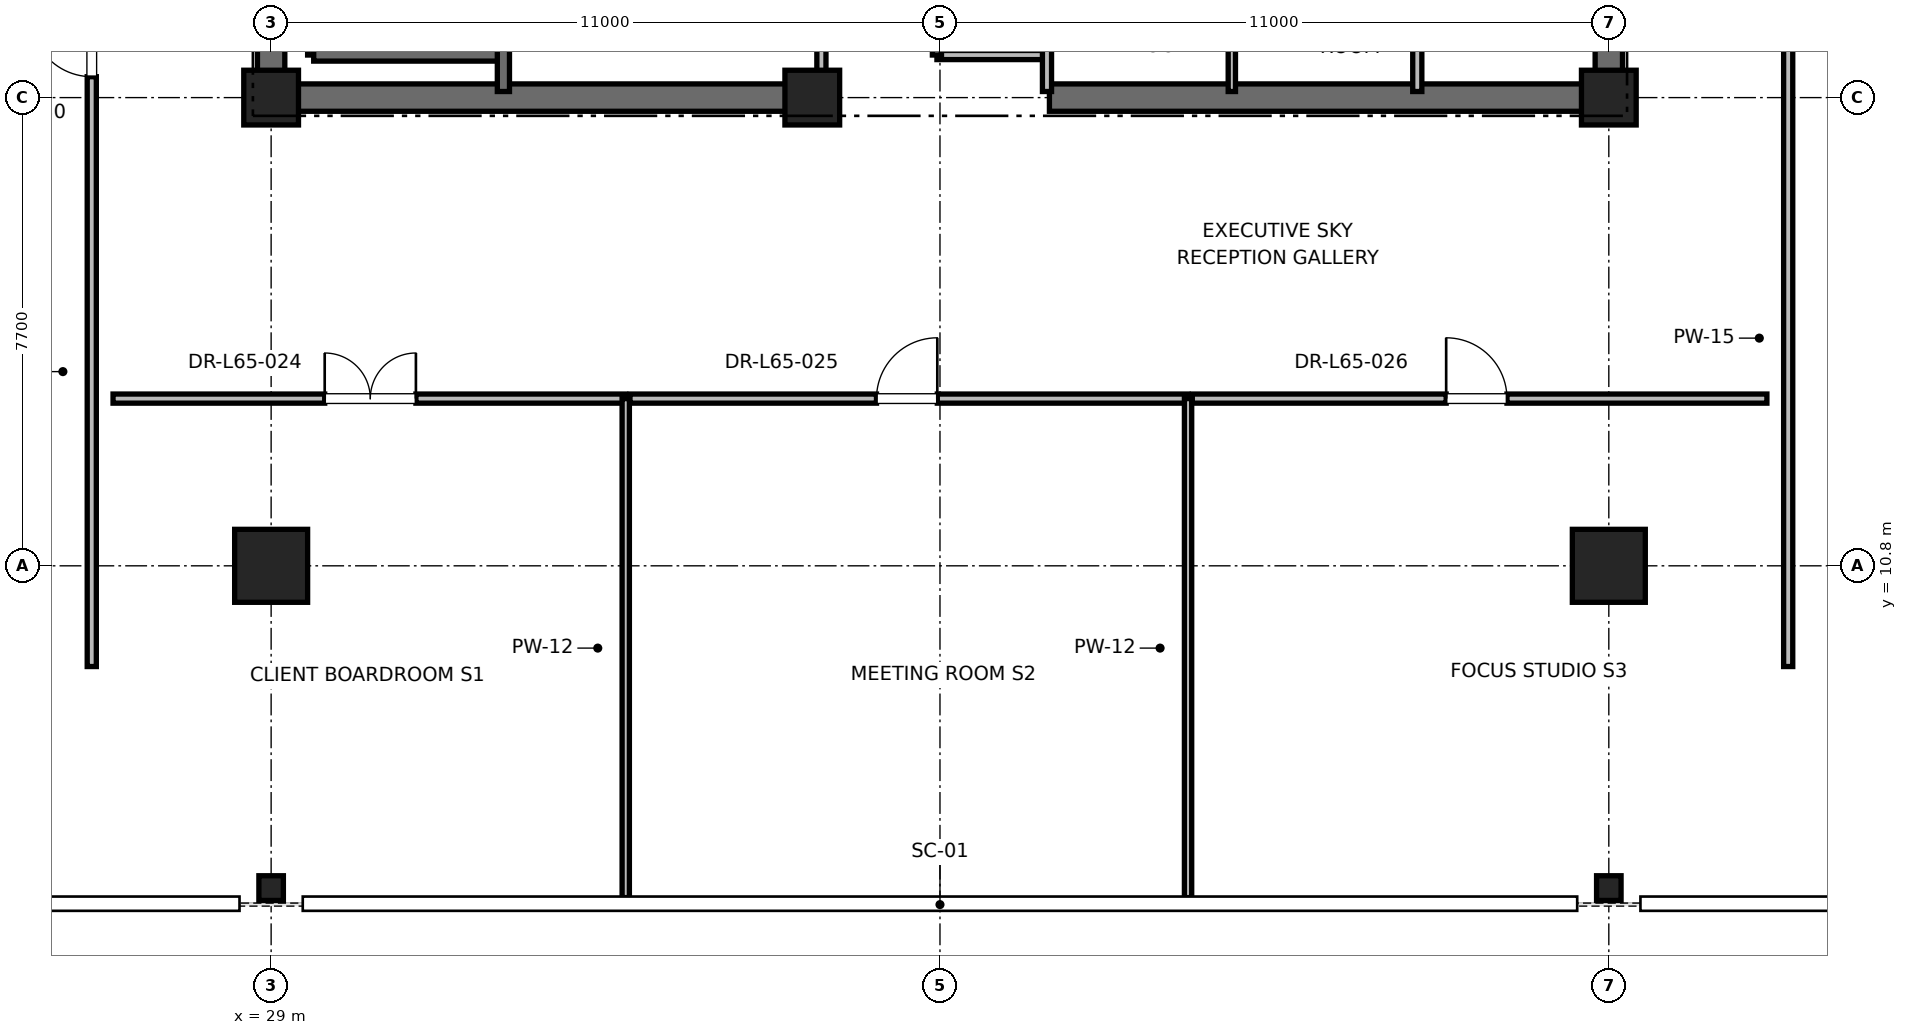
"""IFC4 building model, lengths in metres.
Left out: names, types, materials, properties, quantities, classifications, styles, units other than length and angle.
Written with IfcOpenShell. Run it as: python <this file> out.ifc"""

import sys

from ifc_helpers import new_model, si_unit, direction, frame, frame_2d, origin, origin_2d, place, context, subcontext, project, spatial, rectangle, i_section, extrude, element, fill, save


model = new_model("IFC4")
c1 = context("Model", 3, precision=1e-05, world=origin(), true_north=direction((0.0, 1.0)))
c2 = subcontext(c1, "Body", "Model", "MODEL_VIEW")
j1 = project(units=[si_unit("LENGTHUNIT", "METRE"), si_unit("PLANEANGLEUNIT", "RADIAN")], contexts=[c1])
p1 = place(None, origin())
s1 = spatial("IfcSite", under=j1, at=p1, CompositionType="ELEMENT")
p2 = place(p1, origin())
s2 = spatial("IfcBuilding", under=s1, at=p2, CompositionType="ELEMENT")
p3 = place(p2, frame((0.0, 0.0, 279.2)))
s3 = spatial("IfcBuildingStorey", under=s2, at=p3, CompositionType="ELEMENT", Elevation=279.2)
for number, where, z_axis, x_axis in (
    (1, (29.0, 10.8, 0.0), (0.0, 0.0, 1.0), (1.0, 0.0, 0.0)),
    (2, (51.0, 10.8, 0.0), (0.0, 0.0, 1.0), (1.0, 0.0, 0.0)),
):
    element("IfcColumn", number, at=place(p3, frame(where, z_axis=z_axis, x_axis=x_axis)), inside=s3, PredefinedType="COLUMN", context=c2, shape_type="SweptSolid", body=[
        extrude(rectangle(XDim=1.2, YDim=1.2, at=origin_2d()), origin(), (0.0, 0.0, 1.0), 4.0),
    ])
for number, where, z_axis, x_axis in (
    (3, (29.0, 5.5, 0.0), (0.0, 0.0, 1.0), (1.0, 0.0, 0.0)),
    (4, (51.0, 5.5, 0.0), (0.0, 0.0, 1.0), (1.0, 0.0, 0.0)),
):
    element("IfcColumn", number, at=place(p3, frame(where, z_axis=z_axis, x_axis=x_axis)), inside=s3, PredefinedType="COLUMN", context=c2, shape_type="SweptSolid", body=[
        extrude(i_section(OverallWidth=0.403, OverallDepth=0.406, WebThickness=0.027, FlangeThickness=0.043, FilletRadius=0.015, at=origin_2d()), origin(), (0.0, 0.0, 1.0), 4.0),
    ])
for number, where, z_axis, x_axis in (
    (5, (29.0, 18.5, 0.0), (0.0, 0.0, 1.0), (1.0, 0.0, 0.0)),
    (6, (51.0, 18.5, 0.0), (0.0, 0.0, 1.0), (1.0, 0.0, 0.0)),
    (7, (37.9, 18.5, 0.0), (0.0, 0.0, 1.0), (1.0, 0.0, 0.0)),
):
    element("IfcColumn", number, at=place(p3, frame(where, z_axis=z_axis, x_axis=x_axis)), inside=s3, PredefinedType="PILASTER", context=c2, shape_type="SweptSolid", body=[
        extrude(rectangle(XDim=0.9, YDim=0.9, at=origin_2d()), origin(), (0.0, 0.0, 1.0), 4.0),
    ])
for number, where, z_axis, x_axis in (
    (8, (29.0, 18.5, 0.0), (0.0, 0.0, 1.0), (1.0, 0.0, 0.0)),
    (9, (41.8, 18.5, 0.0), (0.0, 0.0, 1.0), (1.0, 0.0, 0.0)),
):
    element("IfcWall", number, at=place(p3, frame(where, z_axis=z_axis, x_axis=x_axis)), inside=s3, PredefinedType="SHEAR", context=c2, shape_type="SweptSolid", body=[
        extrude(rectangle(XDim=9.2, YDim=0.45, at=frame_2d((4.6, 0.0))), origin(), (0.0, 0.0, 1.0), 3.785),
    ])
p4 = place(p3, frame((29.0, 18.5, 0.0), z_axis=(0.0, 0.0, 1.0), x_axis=(0.0, 1.0, 0.0)))
e10 = element("IfcWall", 10, at=p4, inside=s3, PredefinedType="SHEAR", context=c2, shape_type="SweptSolid", body=[
    extrude(rectangle(XDim=8.8, YDim=0.45, at=frame_2d((4.4, 0.0))), origin(), (0.0, 0.0, 1.0), 3.785),
])
p5 = place(p3, frame((51.0, 18.5, 0.0), z_axis=(0.0, 0.0, 1.0), x_axis=(0.0, 1.0, 0.0)))
e11 = element("IfcWall", 11, at=p5, inside=s3, PredefinedType="SHEAR", context=c2, shape_type="SweptSolid", body=[
    extrude(rectangle(XDim=5.8, YDim=0.45, at=frame_2d((2.9, 0.0))), origin(), (0.0, 0.0, 1.0), 3.785),
])
p6 = place(p3, frame((29.7, 19.2, 0.0), z_axis=(0.0, 0.0, 1.0), x_axis=(0.0, 1.0, 0.0)))
e12 = element("IfcWall", 12, at=p6, inside=s3, PredefinedType="SOLIDWALL", context=c2, shape_type="SweptSolid", body=[
    extrude(rectangle(XDim=8.15, YDim=0.2, at=frame_2d((4.075, 0.0))), origin(), (0.0, 0.0, 1.0), 3.785),
])
p7 = place(p3, frame((29.7, 19.2, 0.0), z_axis=(0.0, 0.0, 1.0), x_axis=(1.0, 0.0, 0.0)))
e13 = element("IfcWall", 13, at=p7, inside=s3, PredefinedType="SOLIDWALL", context=c2, shape_type="SweptSolid", body=[
    extrude(rectangle(XDim=3.12, YDim=0.2, at=frame_2d((1.56, 0.0))), origin(), (0.0, 0.0, 1.0), 3.785),
])
p8 = place(p3, frame((32.82, 18.6, 0.0), z_axis=(0.0, 0.0, 1.0), x_axis=(0.0, 1.0, 0.0)))
e14 = element("IfcWall", 14, at=p8, inside=s3, PredefinedType="SOLIDWALL", context=c2, shape_type="SweptSolid", body=[
    extrude(rectangle(XDim=8.78, YDim=0.2, at=frame_2d((4.39, 0.0))), origin(), (0.0, 0.0, 1.0), 3.785),
])
p9 = place(p3, frame((39.95, 19.2, 0.0), z_axis=(0.0, 0.0, 1.0), x_axis=(1.0, 0.0, 0.0)))
e15 = element("IfcWall", 15, at=p9, inside=s3, PredefinedType="PARTITIONING", context=c2, shape_type="SweptSolid", body=[
    extrude(rectangle(XDim=1.81, YDim=0.15, at=frame_2d((0.905, 0.0))), origin(), (0.0, 0.0, 1.0), 2.85),
])
p10 = place(p3, frame((41.76, 18.6, 0.0), z_axis=(0.0, 0.0, 1.0), x_axis=(0.0, 1.0, 0.0)))
e16 = element("IfcWall", 16, at=p10, inside=s3, PredefinedType="PARTITIONING", context=c2, shape_type="SweptSolid", body=[
    extrude(rectangle(XDim=3.6, YDim=0.15, at=frame_2d((1.8, 0.0))), origin(), (0.0, 0.0, 1.0), 2.85),
])
p11 = place(p3, frame((39.95, 19.2, 0.0), z_axis=(0.0, 0.0, 1.0), x_axis=(0.0, 1.0, 0.0)))
e17 = element("IfcWall", 17, at=p11, inside=s3, PredefinedType="PARTITIONING", context=c2, shape_type="SweptSolid", body=[
    extrude(rectangle(XDim=3.0, YDim=0.15, at=frame_2d((1.5, 0.0))), origin(), (0.0, 0.0, 1.0), 2.85),
])
p12 = place(p11, frame((1.05, 0.0, 0.0)))
e18 = element("IfcOpeningElement", 18, at=p12, cuts=e17, PredefinedType="OPENING", context=c2, shape_type="SweptSolid", body=[
    extrude(rectangle(XDim=0.9, YDim=2.1, at=frame_2d((0.45, 1.05))), frame((0.0, 0.075, 0.0), z_axis=(0.0, -1.0, 0.0), x_axis=(1.0, 0.0, 0.0)), (0.0, 0.0, 1.0), 0.15),
])
p13 = place(p3, frame((38.05, 18.6, 0.0), z_axis=(0.0, 0.0, 1.0), x_axis=(0.0, 1.0, 0.0)))
e19 = element("IfcWall", 19, at=p13, inside=s3, PredefinedType="PARTITIONING", context=c2, shape_type="SweptSolid", body=[
    extrude(rectangle(XDim=4.46, YDim=0.15, at=frame_2d((2.23, 0.0))), origin(), (0.0, 0.0, 1.0), 2.85),
])
p14 = place(p13, frame((1.73, 0.0, 0.0)))
e20 = element("IfcOpeningElement", 20, at=p14, cuts=e19, PredefinedType="OPENING", context=c2, shape_type="SweptSolid", body=[
    extrude(rectangle(XDim=1.0, YDim=2.15, at=frame_2d((0.5, 1.075))), frame((0.0, 0.075, 0.0), z_axis=(0.0, -1.0, 0.0), x_axis=(1.0, 0.0, 0.0)), (0.0, 0.0, 1.0), 0.15),
])
p15 = place(p3, frame((47.85, 18.6, 0.0), z_axis=(0.0, 0.0, 1.0), x_axis=(0.0, 1.0, 0.0)))
e21 = element("IfcWall", 21, at=p15, inside=s3, PredefinedType="PARTITIONING", context=c2, shape_type="SweptSolid", body=[
    extrude(rectangle(XDim=2.54, YDim=0.15, at=frame_2d((1.27, 0.0))), origin(), (0.0, 0.0, 1.0), 2.85),
])
p16 = place(p3, frame((44.8, 18.6, 0.0), z_axis=(0.0, 0.0, 1.0), x_axis=(0.0, 1.0, 0.0)))
e22 = element("IfcWall", 22, at=p16, inside=s3, PredefinedType="PARTITIONING", context=c2, shape_type="SweptSolid", body=[
    extrude(rectangle(XDim=3.02, YDim=0.12, at=frame_2d((1.51, 0.0))), origin(), (0.0, 0.0, 1.0), 2.85),
])
p17 = place(p3, frame((26.4, 13.55, 0.0), z_axis=(0.0, 0.0, 1.0), x_axis=(1.0, 0.0, 0.0)))
e23 = element("IfcWall", 23, at=p17, inside=s3, PredefinedType="PARTITIONING", context=c2, shape_type="SweptSolid", body=[
    extrude(rectangle(XDim=8.432, YDim=0.15, at=frame_2d((4.216, 0.0))), origin(), (0.0, 0.0, 1.0), 2.85),
])
p18 = place(p17, frame((3.481, 0.0, 0.0)))
e24 = element("IfcOpeningElement", 24, at=p18, cuts=e23, PredefinedType="OPENING", context=c2, shape_type="SweptSolid", body=[
    extrude(rectangle(XDim=1.5, YDim=2.25, at=frame_2d((0.75, 1.125))), frame((0.0, 0.075, 0.0), z_axis=(0.0, -1.0, 0.0), x_axis=(1.0, 0.0, 0.0)), (0.0, 0.0, 1.0), 0.15),
])
p19 = place(p3, frame((34.832, 5.344, 0.0), z_axis=(0.0, 0.0, 1.0), x_axis=(0.0, 1.0, 0.0)))
e25 = element("IfcWall", 25, at=p19, inside=s3, PredefinedType="PARTITIONING", context=c2, shape_type="SweptSolid", body=[
    extrude(rectangle(XDim=8.206, YDim=0.12, at=frame_2d((4.103, 0.0))), origin(), (0.0, 0.0, 1.0), 2.415),
])
p20 = place(p3, frame((34.902, 13.55, 0.0), z_axis=(0.0, 0.0, 1.0), x_axis=(1.0, 0.0, 0.0)))
e26 = element("IfcWall", 26, at=p20, inside=s3, PredefinedType="PARTITIONING", context=c2, shape_type="SweptSolid", body=[
    extrude(rectangle(XDim=9.178, YDim=0.15, at=frame_2d((4.589, 0.0))), origin(), (0.0, 0.0, 1.0), 2.85),
])
p21 = place(p20, frame((4.054, 0.0, 0.0)))
e27 = element("IfcOpeningElement", 27, at=p21, cuts=e26, PredefinedType="OPENING", context=c2, shape_type="SweptSolid", body=[
    extrude(rectangle(XDim=1.0, YDim=2.15, at=frame_2d((0.5, 1.075))), frame((0.0, 0.075, 0.0), z_axis=(0.0, -1.0, 0.0), x_axis=(1.0, 0.0, 0.0)), (0.0, 0.0, 1.0), 0.15),
])
p22 = place(p3, frame((44.08, 5.344, 0.0), z_axis=(0.0, 0.0, 1.0), x_axis=(0.0, 1.0, 0.0)))
e28 = element("IfcWall", 28, at=p22, inside=s3, PredefinedType="PARTITIONING", context=c2, shape_type="SweptSolid", body=[
    extrude(rectangle(XDim=8.206, YDim=0.12, at=frame_2d((4.103, 0.0))), origin(), (0.0, 0.0, 1.0), 2.415),
])
p23 = place(p3, frame((44.15, 13.55, 0.0), z_axis=(0.0, 0.0, 1.0), x_axis=(1.0, 0.0, 0.0)))
e29 = element("IfcWall", 29, at=p23, inside=s3, PredefinedType="PARTITIONING", context=c2, shape_type="SweptSolid", body=[
    extrude(rectangle(XDim=9.45, YDim=0.15, at=frame_2d((4.725, 0.0))), origin(), (0.0, 0.0, 1.0), 2.85),
])
p24 = place(p23, frame((4.175, 0.0, 0.0)))
e30 = element("IfcOpeningElement", 30, at=p24, cuts=e29, PredefinedType="OPENING", context=c2, shape_type="SweptSolid", body=[
    extrude(rectangle(XDim=1.0, YDim=2.15, at=frame_2d((0.5, 1.075))), frame((0.0, 0.075, 0.0), z_axis=(0.0, -1.0, 0.0), x_axis=(1.0, 0.0, 0.0)), (0.0, 0.0, 1.0), 0.15),
])
p25 = place(p3, frame((26.05, 9.144, 0.0), z_axis=(0.0, 0.0, 1.0), x_axis=(0.0, 1.0, 0.0)))
e31 = element("IfcWall", 31, at=p25, inside=s3, PredefinedType="PARTITIONING", context=c2, shape_type="SweptSolid", body=[
    extrude(rectangle(XDim=11.014, YDim=0.15, at=frame_2d((5.507, 0.0))), origin(), (0.0, 0.0, 1.0), 2.85),
])
p26 = place(p25, frame((9.7, 0.0, 0.0)))
e32 = element("IfcOpeningElement", 32, at=p26, cuts=e31, PredefinedType="OPENING", context=c2, shape_type="SweptSolid", body=[
    extrude(rectangle(XDim=1.0, YDim=2.15, at=frame_2d((0.5, 1.075))), frame((0.0, 0.075, 0.0), z_axis=(0.0, -1.0, 0.0), x_axis=(1.0, 0.0, 0.0)), (0.0, 0.0, 1.0), 0.15),
])
p27 = place(p3, frame((53.95, 9.144, 0.0), z_axis=(0.0, 0.0, 1.0), x_axis=(0.0, 1.0, 0.0)))
e33 = element("IfcWall", 33, at=p27, inside=s3, PredefinedType="PARTITIONING", context=c2, shape_type="SweptSolid", body=[
    extrude(rectangle(XDim=13.216, YDim=0.15, at=frame_2d((6.608, 0.0))), origin(), (0.0, 0.0, 1.0), 2.85),
])
p28 = place(p27, frame((10.802, 0.0, 0.0)))
e34 = element("IfcOpeningElement", 34, at=p28, cuts=e33, PredefinedType="OPENING", context=c2, shape_type="SweptSolid", body=[
    extrude(rectangle(XDim=1.0, YDim=2.15, at=frame_2d((0.5, 1.075))), frame((0.0, 0.075, 0.0), z_axis=(0.0, -1.0, 0.0), x_axis=(1.0, 0.0, 0.0)), (0.0, 0.0, 1.0), 0.15),
])
p29 = place(p18, origin())
e35 = element("IfcDoor", 35, at=p29, inside=s3, OperationType="DOUBLE_DOOR_SINGLE_SWING", PredefinedType="DOOR", context=c2, shape_type="SweptSolid", body=[
    extrude(rectangle(XDim=1.5, YDim=2.25, at=frame_2d((0.75, 1.125))), frame((0.0, 0.025, 0.0), z_axis=(0.0, -1.0, 0.0), x_axis=(1.0, 0.0, 0.0)), (0.0, 0.0, 1.0), 0.05),
])
fill(e24, e35)
p30 = place(p21, origin())
e36 = element("IfcDoor", 36, at=p30, inside=s3, OperationType="SINGLE_SWING_RIGHT", PredefinedType="DOOR", context=c2, shape_type="SweptSolid", body=[
    extrude(rectangle(XDim=1.0, YDim=2.15, at=frame_2d((0.5, 1.075))), frame((0.0, 0.025, 0.0), z_axis=(0.0, -1.0, 0.0), x_axis=(1.0, 0.0, 0.0)), (0.0, 0.0, 1.0), 0.05),
])
fill(e27, e36)
p31 = place(p24, origin())
e37 = element("IfcDoor", 37, at=p31, inside=s3, OperationType="SINGLE_SWING_LEFT", PredefinedType="DOOR", context=c2, shape_type="SweptSolid", body=[
    extrude(rectangle(XDim=1.0, YDim=2.15, at=frame_2d((0.5, 1.075))), frame((0.0, 0.025, 0.0), z_axis=(0.0, -1.0, 0.0), x_axis=(1.0, 0.0, 0.0)), (0.0, 0.0, 1.0), 0.05),
])
fill(e30, e37)
p32 = place(p26, origin())
e38 = element("IfcDoor", 38, at=p32, inside=s3, OperationType="SINGLE_SWING_RIGHT", PredefinedType="DOOR", context=c2, shape_type="SweptSolid", body=[
    extrude(rectangle(XDim=1.0, YDim=2.15, at=frame_2d((0.5, 1.075))), frame((0.0, 0.025, 0.0), z_axis=(0.0, -1.0, 0.0), x_axis=(1.0, 0.0, 0.0)), (0.0, 0.0, 1.0), 0.05),
])
fill(e32, e38)
save(model, sys.argv[1])
